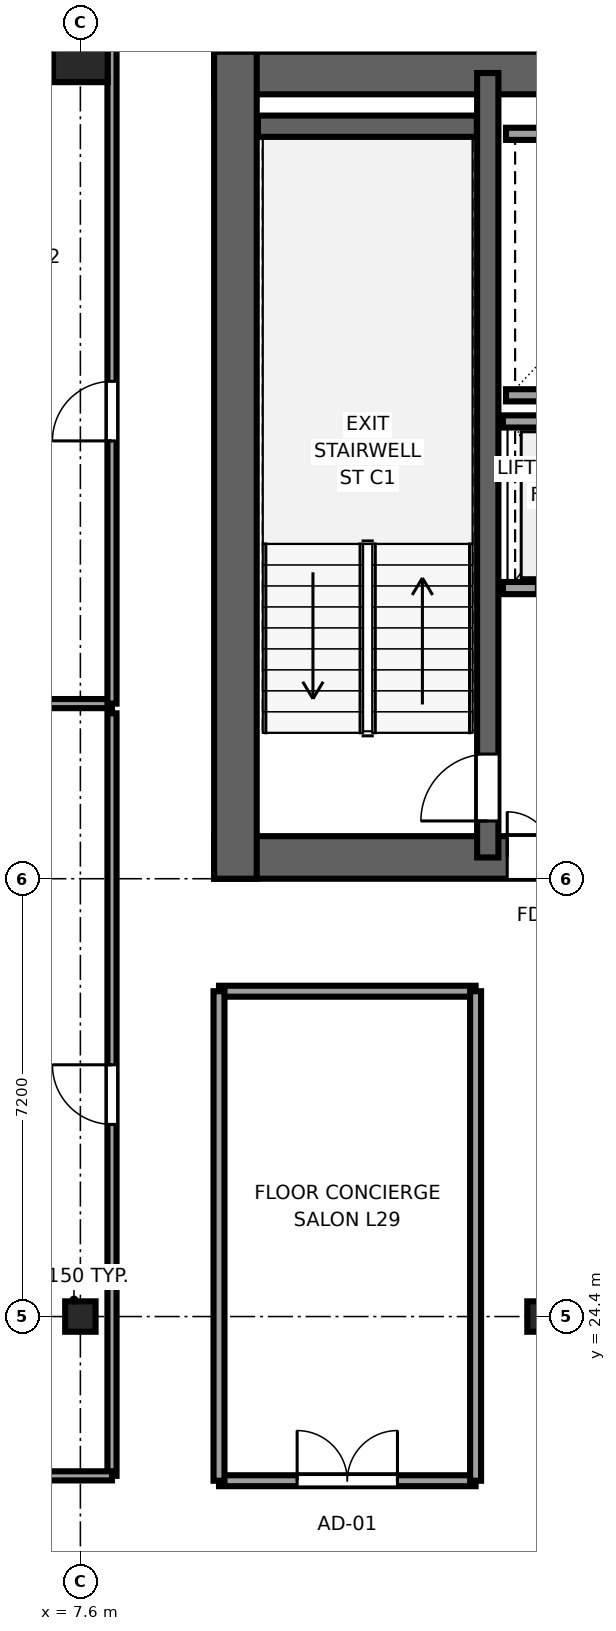
"""IFC4 building model, lengths in metres.
Left out: names, types, materials, properties, quantities, classifications, styles, units other than length and angle.
Written with IfcOpenShell. Run it as: python <this file> out.ifc"""

import sys

from ifc_helpers import new_model, si_unit, direction, frame, frame_2d, origin, origin_2d, place, context, subcontext, project, spatial, rectangle, i_section, extrude, source, transform, mapped, element, fill, save


model = new_model("IFC4")
c1 = context("Model", 3, precision=1e-05, world=origin(), true_north=direction((0.0, 1.0)))
c2 = subcontext(c1, "Body", "Model", "MODEL_VIEW")
j1 = project(units=[si_unit("LENGTHUNIT", "METRE"), si_unit("PLANEANGLEUNIT", "RADIAN")], contexts=[c1])
p1 = place(None, origin())
s1 = spatial("IfcSite", under=j1, at=p1, CompositionType="ELEMENT")
p2 = place(p1, origin())
s2 = spatial("IfcBuilding", under=s1, at=p2, CompositionType="ELEMENT")
p3 = place(p2, frame((0.0, 0.0, 115.1)))
s3 = spatial("IfcBuildingStorey", under=s2, at=p3, CompositionType="ELEMENT", Elevation=115.1)
p4 = place(p3, frame((9.8, 31.95, 0.0), z_axis=(0.0, 0.0, 1.0), x_axis=(1.0, 0.0, 0.0)))
e1 = element("IfcWall", 1, at=p4, inside=s3, PredefinedType="SHEAR", context=c2, shape_type="SweptSolid", body=[
    extrude(rectangle(XDim=26.4, YDim=0.7, at=frame_2d((13.2, 0.0))), origin(), (0.0, 0.0, 1.0), 3.55),
])
p5 = place(p4, frame((6.32, 0.0, 0.0), z_axis=(0.0, 0.0, 1.0), x_axis=(-1.0, 0.0, 0.0)))
e2 = element("IfcOpeningElement", 2, at=p5, cuts=e1, PredefinedType="OPENING", context=c2, shape_type="SweptSolid", body=[
    extrude(rectangle(XDim=1.5, YDim=2.04, at=frame_2d((0.75, 1.02))), frame((0.0, 0.36, 0.0), z_axis=(0.0, -1.0, 0.0), x_axis=(1.0, 0.0, 0.0)), (0.0, 0.0, 1.0), 0.72),
])
p6 = place(p4, frame((13.95, 0.0, 0.0), z_axis=(0.0, 0.0, 1.0), x_axis=(-1.0, 0.0, 0.0)))
e3 = element("IfcOpeningElement", 3, at=p6, cuts=e1, PredefinedType="OPENING", context=c2, shape_type="SweptSolid", body=[
    extrude(rectangle(XDim=1.5, YDim=2.04, at=frame_2d((0.75, 1.02))), frame((0.0, 0.36, 0.0), z_axis=(0.0, -1.0, 0.0), x_axis=(1.0, 0.0, 0.0)), (0.0, 0.0, 1.0), 0.72),
])
p7 = place(p4, frame((21.58, 0.0, 0.0), z_axis=(0.0, 0.0, 1.0), x_axis=(-1.0, 0.0, 0.0)))
e4 = element("IfcOpeningElement", 4, at=p7, cuts=e1, PredefinedType="OPENING", context=c2, shape_type="SweptSolid", body=[
    extrude(rectangle(XDim=1.5, YDim=2.04, at=frame_2d((0.75, 1.02))), frame((0.0, 0.36, 0.0), z_axis=(0.0, -1.0, 0.0), x_axis=(1.0, 0.0, 0.0)), (0.0, 0.0, 1.0), 0.72),
])
p8 = place(p4, frame((8.37, 0.0, 0.0), z_axis=(0.0, 0.0, 1.0), x_axis=(-1.0, 0.0, 0.0)))
e5 = element("IfcOpeningElement", 5, at=p8, cuts=e1, PredefinedType="OPENING", context=c2, shape_type="SweptSolid", body=[
    extrude(rectangle(XDim=0.82, YDim=2.01, at=frame_2d((0.41, 1.005))), frame((0.0, 0.36, 0.0), z_axis=(0.0, -1.0, 0.0), x_axis=(1.0, 0.0, 0.0)), (0.0, 0.0, 1.0), 0.72),
])
p9 = place(p4, frame((18.87, 0.0, 0.0), z_axis=(0.0, 0.0, 1.0), x_axis=(-1.0, 0.0, 0.0)))
e6 = element("IfcOpeningElement", 6, at=p9, cuts=e1, PredefinedType="OPENING", context=c2, shape_type="SweptSolid", body=[
    extrude(rectangle(XDim=0.82, YDim=2.01, at=frame_2d((0.41, 1.005))), frame((0.0, 0.36, 0.0), z_axis=(0.0, -1.0, 0.0), x_axis=(1.0, 0.0, 0.0)), (0.0, 0.0, 1.0), 0.72),
])
p10 = place(p3, frame((9.8, 44.85, 0.0), z_axis=(0.0, 0.0, 1.0), x_axis=(1.0, 0.0, 0.0)))
e7 = element("IfcWall", 7, at=p10, inside=s3, PredefinedType="SHEAR", context=c2, shape_type="SweptSolid", body=[
    extrude(rectangle(XDim=26.4, YDim=0.7, at=frame_2d((13.2, 0.0))), origin(), (0.0, 0.0, 1.0), 3.55),
])
p11 = place(p3, frame((10.15, 31.6, 0.0), z_axis=(0.0, 0.0, 1.0), x_axis=(0.0, 1.0, 0.0)))
e8 = element("IfcWall", 8, at=p11, inside=s3, PredefinedType="SHEAR", context=c2, shape_type="SweptSolid", body=[
    extrude(rectangle(XDim=13.6, YDim=0.7, at=frame_2d((6.8, 0.0))), origin(), (0.0, 0.0, 1.0), 3.55),
])
p12 = place(p3, frame((14.3, 31.95, 0.0), z_axis=(0.0, 0.0, 1.0), x_axis=(0.0, 1.0, 0.0)))
e9 = element("IfcWall", 9, at=p12, inside=s3, PredefinedType="SHEAR", context=c2, shape_type="SweptSolid", body=[
    extrude(rectangle(XDim=12.9, YDim=0.35, at=frame_2d((6.45, 0.0))), origin(), (0.0, 0.0, 1.0), 3.55),
])
p13 = place(p12, frame((0.6, 0.0, 0.0)))
e10 = element("IfcOpeningElement", 10, at=p13, cuts=e9, PredefinedType="OPENING", context=c2, shape_type="SweptSolid", body=[
    extrude(rectangle(XDim=1.1, YDim=2.12, at=frame_2d((0.55, 1.06))), frame((0.0, 0.185, 0.0), z_axis=(0.0, -1.0, 0.0), x_axis=(1.0, 0.0, 0.0)), (0.0, 0.0, 1.0), 0.37),
])
p14 = place(p3, frame((10.52, 43.975, 0.0), z_axis=(0.0, 0.0, 1.0), x_axis=(1.0, 0.0, 0.0)))
e11 = element("IfcWall", 11, at=p14, inside=s3, PredefinedType="SHEAR", context=c2, shape_type="SweptSolid", body=[
    extrude(rectangle(XDim=3.6, YDim=0.35, at=frame_2d((1.8, 0.0))), origin(), (0.0, 0.0, 1.0), 3.55),
])
m1 = source(origin(), c2, "Body", "SweptSolid", [
    extrude(i_section(OverallWidth=0.5, OverallDepth=0.5, WebThickness=0.022, FlangeThickness=0.034, at=origin_2d()), origin(), (0.0, 0.0, 1.0), 3.55),
])
for number, where, z_axis, x_axis in (
    (12, (7.6, 24.4, 0.0), (0.0, 0.0, 1.0), (1.0, 0.0, 0.0)),
    (13, (15.2, 24.4, 0.0), (0.0, 0.0, 1.0), (1.0, 0.0, 0.0)),
):
    element("IfcColumn", number, at=place(p3, frame(where, z_axis=z_axis, x_axis=x_axis)), inside=s3, PredefinedType="COLUMN", context=c2, shape_type="MappedRepresentation", body=[
        mapped(m1, transform((0.0, 0.0, 0.0), x_axis=(1.0, 0.0, 0.0), y_axis=(0.0, 1.0, 0.0), z_axis=(0.0, 0.0, 1.0), scale=1.0)),
    ])
m2 = source(origin(), c2, "Body", "SweptSolid", [
    extrude(rectangle(XDim=0.9, YDim=0.9, at=origin_2d()), origin(), (0.0, 0.0, 1.0), 3.55),
])
p15 = place(p3, frame((7.6, 45.15, 0.0), z_axis=(0.0, 0.0, 1.0), x_axis=(1.0, 0.0, 0.0)))
e14 = element("IfcColumn", 14, at=p15, inside=s3, PredefinedType="COLUMN", context=c2, shape_type="MappedRepresentation", body=[
    mapped(m2, transform((0.0, 0.0, 0.0), x_axis=(1.0, 0.0, 0.0), y_axis=(0.0, 1.0, 0.0), z_axis=(0.0, 0.0, 1.0), scale=1.0)),
])
for number, where, z_axis, x_axis in (
    (15, (14.6, 39.55, 0.0), (0.0, 0.0, 1.0), (1.0, 0.0, 0.0)),
    (16, (14.6, 43.85, 0.0), (0.0, 0.0, 1.0), (1.0, 0.0, 0.0)),
):
    element("IfcWall", number, at=place(p3, frame(where, z_axis=z_axis, x_axis=x_axis)), inside=s3, PredefinedType="SOLIDWALL", context=c2, shape_type="SweptSolid", body=[
        extrude(rectangle(XDim=4.1, YDim=0.2, at=frame_2d((2.05, 0.0))), origin(), (0.0, 0.0, 1.0), 3.37),
    ])
p16 = place(p3, frame((14.55, 36.38, 0.0), z_axis=(0.0, 0.0, 1.0), x_axis=(1.0, 0.0, 0.0)))
e17 = element("IfcWall", 17, at=p16, inside=s3, PredefinedType="SOLIDWALL", context=c2, shape_type="SweptSolid", body=[
    extrude(rectangle(XDim=4.075, YDim=0.2, at=frame_2d((2.038, 0.0))), origin(), (0.0, 0.0, 1.0), 3.37),
])
p17 = place(p16, frame((0.55, 0.0, 0.0)))
e18 = element("IfcOpeningElement", 18, at=p17, cuts=e17, PredefinedType="OPENING", context=c2, shape_type="SweptSolid", body=[
    extrude(rectangle(XDim=1.1, YDim=2.12, at=frame_2d((0.55, 1.06))), frame((0.0, 0.11, 0.0), z_axis=(0.0, -1.0, 0.0), x_axis=(1.0, 0.0, 0.0)), (0.0, 0.0, 1.0), 0.22),
])
p18 = place(p16, frame((2.45, 0.0, 0.0)))
e19 = element("IfcOpeningElement", 19, at=p18, cuts=e17, PredefinedType="OPENING", context=c2, shape_type="SweptSolid", body=[
    extrude(rectangle(XDim=1.1, YDim=2.12, at=frame_2d((0.55, 1.06))), frame((0.0, 0.11, 0.0), z_axis=(0.0, -1.0, 0.0), x_axis=(1.0, 0.0, 0.0)), (0.0, 0.0, 1.0), 0.22),
])
p19 = place(p3, frame((14.55, 39.12, 0.0), z_axis=(0.0, 0.0, 1.0), x_axis=(1.0, 0.0, 0.0)))
e20 = element("IfcWall", 20, at=p19, inside=s3, PredefinedType="SOLIDWALL", context=c2, shape_type="SweptSolid", body=[
    extrude(rectangle(XDim=4.075, YDim=0.2, at=frame_2d((2.038, 0.0))), origin(), (0.0, 0.0, 1.0), 3.37),
])
p20 = place(p3, frame((0.405, 34.48, 0.0), z_axis=(0.0, 0.0, 1.0), x_axis=(1.0, 0.0, 0.0)))
e21 = element("IfcWall", 21, at=p20, inside=s3, PredefinedType="PARTITIONING", context=c2, shape_type="SweptSolid", body=[
    extrude(rectangle(XDim=7.715, YDim=0.15, at=frame_2d((3.857, 0.0))), origin(), (0.0, 0.0, 1.0), 3.37),
])
p21 = place(p3, frame((8.12, 21.78, 0.0), z_axis=(0.0, 0.0, 1.0), x_axis=(0.0, 1.0, 0.0)))
e22 = element("IfcWall", 22, at=p21, inside=s3, PredefinedType="PARTITIONING", context=c2, shape_type="SweptSolid", body=[
    extrude(rectangle(XDim=12.54, YDim=0.15, at=frame_2d((6.27, 0.0))), origin(), (0.0, 0.0, 1.0), 3.37),
])
p22 = place(p21, frame((5.78, 0.0, 0.0)))
e23 = element("IfcOpeningElement", 23, at=p22, cuts=e22, PredefinedType="OPENING", context=c2, shape_type="SweptSolid", body=[
    extrude(rectangle(XDim=0.98, YDim=2.12, at=frame_2d((0.49, 1.06))), frame((0.0, 0.085, 0.0), z_axis=(0.0, -1.0, 0.0), x_axis=(1.0, 0.0, 0.0)), (0.0, 0.0, 1.0), 0.17),
])
p23 = place(p3, frame((2.77, 21.78, 0.0), z_axis=(0.0, 0.0, 1.0), x_axis=(1.0, 0.0, 0.0)))
e24 = element("IfcWall", 24, at=p23, inside=s3, PredefinedType="PARTITIONING", context=c2, shape_type="SweptSolid", body=[
    extrude(rectangle(XDim=5.35, YDim=0.15, at=frame_2d((2.675, 0.0))), origin(), (0.0, 0.0, 1.0), 3.37),
])
p24 = place(p3, frame((8.12, 34.48, 0.0), z_axis=(0.0, 0.0, 1.0), x_axis=(0.0, 1.0, 0.0)))
e25 = element("IfcWall", 25, at=p24, inside=s3, PredefinedType="PARTITIONING", context=c2, shape_type="SweptSolid", body=[
    extrude(rectangle(XDim=11.115, YDim=0.15, at=frame_2d((5.558, 0.0))), origin(), (0.0, 0.0, 1.0), 3.37),
])
p25 = place(p24, frame((4.32, 0.0, 0.0)))
e26 = element("IfcOpeningElement", 26, at=p25, cuts=e25, PredefinedType="OPENING", context=c2, shape_type="SweptSolid", body=[
    extrude(rectangle(XDim=0.98, YDim=2.12, at=frame_2d((0.49, 1.06))), frame((0.0, 0.085, 0.0), z_axis=(0.0, -1.0, 0.0), x_axis=(1.0, 0.0, 0.0)), (0.0, 0.0, 1.0), 0.17),
])
p26 = place(p3, frame((9.88, 21.7, 0.0), z_axis=(0.0, 0.0, 1.0), x_axis=(1.0, 0.0, 0.0)))
e27 = element("IfcWall", 27, at=p26, inside=s3, PredefinedType="PARTITIONING", context=c2, shape_type="SweptSolid", body=[
    extrude(rectangle(XDim=4.22, YDim=0.18, at=frame_2d((2.11, 0.0))), origin(), (0.0, 0.0, 1.0), 3.37),
])
p27 = place(p26, frame((1.285, 0.0, 0.0)))
e28 = element("IfcOpeningElement", 28, at=p27, cuts=e27, PredefinedType="OPENING", context=c2, shape_type="SweptSolid", body=[
    extrude(rectangle(XDim=1.65, YDim=2.15, at=frame_2d((0.825, 1.075))), frame((0.0, 0.1, 0.0), z_axis=(0.0, -1.0, 0.0), x_axis=(1.0, 0.0, 0.0)), (0.0, 0.0, 1.0), 0.2),
])
p28 = place(p3, frame((9.88, 29.75, 0.0), z_axis=(0.0, 0.0, 1.0), x_axis=(1.0, 0.0, 0.0)))
e29 = element("IfcWall", 29, at=p28, inside=s3, PredefinedType="PARTITIONING", context=c2, shape_type="SweptSolid", body=[
    extrude(rectangle(XDim=4.22, YDim=0.18, at=frame_2d((2.11, 0.0))), origin(), (0.0, 0.0, 1.0), 3.37),
])
for number, where, z_axis, x_axis in (
    (30, (9.88, 21.7, 0.0), (0.0, 0.0, 1.0), (0.0, 1.0, 0.0)),
    (31, (14.1, 21.7, 0.0), (0.0, 0.0, 1.0), (0.0, 1.0, 0.0)),
):
    element("IfcWall", number, at=place(p3, frame(where, z_axis=z_axis, x_axis=x_axis)), inside=s3, PredefinedType="PARTITIONING", context=c2, shape_type="SweptSolid", body=[
        extrude(rectangle(XDim=8.05, YDim=0.18, at=frame_2d((4.025, 0.0))), origin(), (0.0, 0.0, 1.0), 3.37),
    ])
m3 = source(origin(), c2, "Body", "SweptSolid", [
    extrude(rectangle(XDim=1.1, YDim=2.12, at=frame_2d((0.55, 1.06))), frame((0.0, 0.025, 0.0), z_axis=(0.0, -1.0, 0.0), x_axis=(1.0, 0.0, 0.0)), (0.0, 0.0, 1.0), 0.05),
])
p29 = place(p13, origin())
e32 = element("IfcDoor", 32, at=p29, inside=s3, OperationType="SINGLE_SWING_LEFT", PredefinedType="DOOR", context=c2, shape_type="MappedRepresentation", body=[
    mapped(m3, transform((0.0, 0.0, 0.0), x_axis=(1.0, 0.0, 0.0), y_axis=(0.0, 1.0, 0.0), z_axis=(0.0, 0.0, 1.0), scale=1.0)),
])
fill(e10, e32)
m4 = source(origin(), c2, "Body", "SweptSolid", [
    extrude(rectangle(XDim=1.5, YDim=2.04, at=frame_2d((0.75, 1.02))), frame((0.0, 0.025, 0.0), z_axis=(0.0, -1.0, 0.0), x_axis=(1.0, 0.0, 0.0)), (0.0, 0.0, 1.0), 0.05),
])
p30 = place(p5, origin())
e33 = element("IfcDoor", 33, at=p30, inside=s3, OperationType="DOUBLE_DOOR_SINGLE_SWING", PredefinedType="DOOR", context=c2, shape_type="MappedRepresentation", body=[
    mapped(m4, transform((0.0, 0.0, 0.0), x_axis=(1.0, 0.0, 0.0), y_axis=(0.0, 1.0, 0.0), z_axis=(0.0, 0.0, 1.0), scale=1.0)),
])
fill(e2, e33)
m5 = source(origin(), c2, "Body", "SweptSolid", [
    extrude(rectangle(XDim=0.98, YDim=2.12, at=frame_2d((0.49, 1.06))), frame((0.0, 0.025, 0.0), z_axis=(0.0, -1.0, 0.0), x_axis=(1.0, 0.0, 0.0)), (0.0, 0.0, 1.0), 0.05),
])
p31 = place(p22, origin())
e34 = element("IfcDoor", 34, at=p31, inside=s3, OperationType="SINGLE_SWING_RIGHT", PredefinedType="DOOR", context=c2, shape_type="MappedRepresentation", body=[
    mapped(m5, transform((0.0, 0.0, 0.0), x_axis=(1.0, 0.0, 0.0), y_axis=(0.0, 1.0, 0.0), z_axis=(0.0, 0.0, 1.0), scale=1.0)),
])
fill(e23, e34)
p32 = place(p25, origin())
e35 = element("IfcDoor", 35, at=p32, inside=s3, OperationType="SINGLE_SWING_LEFT", PredefinedType="DOOR", context=c2, shape_type="MappedRepresentation", body=[
    mapped(m5, transform((0.0, 0.0, 0.0), x_axis=(1.0, 0.0, 0.0), y_axis=(0.0, 1.0, 0.0), z_axis=(0.0, 0.0, 1.0), scale=1.0)),
])
fill(e26, e35)
m6 = source(origin(), c2, "Body", "SweptSolid", [
    extrude(rectangle(XDim=1.65, YDim=2.15, at=frame_2d((0.825, 1.075))), frame((0.0, 0.025, 0.0), z_axis=(0.0, -1.0, 0.0), x_axis=(1.0, 0.0, 0.0)), (0.0, 0.0, 1.0), 0.05),
])
p33 = place(p27, origin())
e36 = element("IfcDoor", 36, at=p33, inside=s3, OperationType="DOUBLE_DOOR_SINGLE_SWING", PredefinedType="DOOR", context=c2, shape_type="MappedRepresentation", body=[
    mapped(m6, transform((0.0, 0.0, 0.0), x_axis=(1.0, 0.0, 0.0), y_axis=(0.0, 1.0, 0.0), z_axis=(0.0, 0.0, 1.0), scale=1.0)),
])
fill(e28, e36)
save(model, sys.argv[1])
